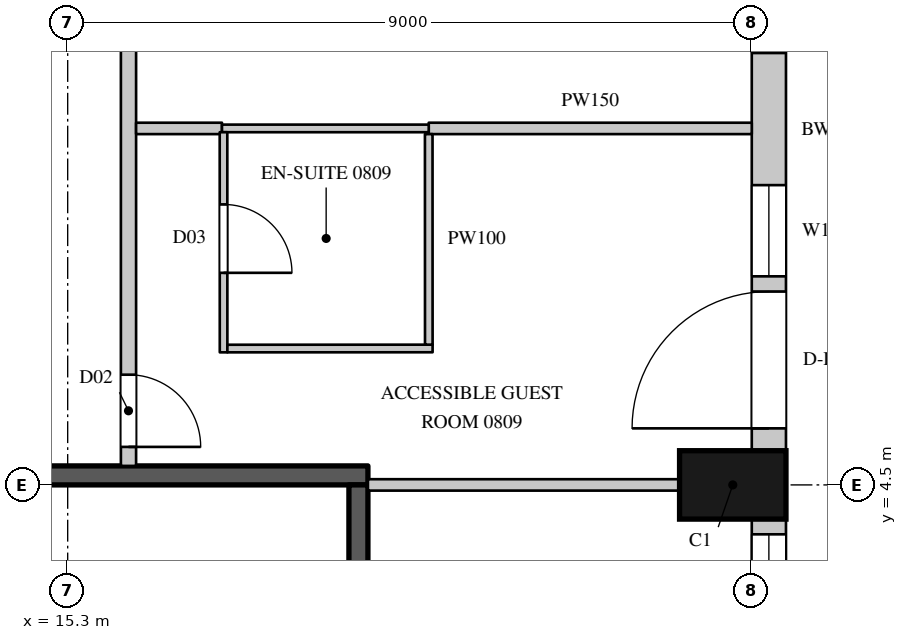
"""IFC4 building model, lengths in metres.
Left out: names, types, materials, properties, quantities, classifications, styles, units other than length and angle.
Written with IfcOpenShell. Run it as: python <this file> out.ifc"""

import sys

from ifc_helpers import new_model, si_unit, direction, frame, frame_2d, origin, origin_2d, place, context, subcontext, project, spatial, rectangle, extrude, element, fill, save


model = new_model("IFC4")
c1 = context("Model", 3, precision=1e-05, world=origin(), true_north=direction((0.0, 1.0)))
c2 = subcontext(c1, "Body", "Model", "MODEL_VIEW")
j1 = project(units=[si_unit("LENGTHUNIT", "METRE"), si_unit("PLANEANGLEUNIT", "RADIAN")], contexts=[c1])
p1 = place(None, origin())
s1 = spatial("IfcSite", under=j1, at=p1, CompositionType="ELEMENT")
p2 = place(p1, origin())
s2 = spatial("IfcBuilding", under=s1, at=p2, CompositionType="ELEMENT")
p3 = place(p2, frame((0.0, 0.0, 59.1)))
s3 = spatial("IfcBuildingStorey", under=s2, at=p3, CompositionType="ELEMENT", Elevation=59.1)
p4 = place(p3, frame((24.05, 4.5, 0.0), z_axis=(0.0, 0.0, 1.0), x_axis=(0.0, 1.0, 0.0)))
e1 = element("IfcColumn", 1, at=p4, inside=s3, PredefinedType="COLUMN", context=c2, shape_type="SweptSolid", body=[
    extrude(rectangle(XDim=0.9, YDim=1.4, at=origin_2d()), origin(), (0.0, 0.0, 1.0), 3.6),
])
p5 = place(p3, frame((24.525, -4.05, 0.0), z_axis=(0.0, 0.0, 1.0), x_axis=(0.0, 1.0, 0.0)))
e2 = element("IfcWall", 2, at=p5, inside=s3, PredefinedType="SOLIDWALL", context=c2, shape_type="SweptSolid", body=[
    extrude(rectangle(XDim=8.1, YDim=0.45, at=frame_2d((4.05, 0.0))), origin(), (0.0, 0.0, 1.0), 3.3),
])
p6 = place(p5, frame((0.2, 0.0, 0.0)))
e3 = element("IfcOpeningElement", 3, at=p6, cuts=e2, PredefinedType="OPENING", context=c2, shape_type="SweptSolid", body=[
    extrude(rectangle(XDim=1.8, YDim=2.4, at=frame_2d((0.9, 1.2))), frame((0.0, 0.235, 0.0), z_axis=(0.0, -1.0, 0.0), x_axis=(1.0, 0.0, 0.0)), (0.0, 0.0, 1.0), 0.47),
])
p7 = place(p5, frame((2.2, 0.0, 1.05)))
e4 = element("IfcOpeningElement", 4, at=p7, cuts=e2, PredefinedType="OPENING", context=c2, shape_type="SweptSolid", body=[
    extrude(rectangle(XDim=1.2, YDim=2.0, at=frame_2d((0.6, 1.0))), frame((0.0, 0.235, 0.0), z_axis=(0.0, -1.0, 0.0), x_axis=(1.0, 0.0, 0.0)), (0.0, 0.0, 1.0), 0.47),
])
p8 = place(p5, frame((4.7, 0.0, 0.0)))
e5 = element("IfcOpeningElement", 5, at=p8, cuts=e2, PredefinedType="OPENING", context=c2, shape_type="SweptSolid", body=[
    extrude(rectangle(XDim=1.8, YDim=2.4, at=frame_2d((0.9, 1.2))), frame((0.0, 0.235, 0.0), z_axis=(0.0, -1.0, 0.0), x_axis=(1.0, 0.0, 0.0)), (0.0, 0.0, 1.0), 0.47),
])
p9 = place(p5, frame((6.7, 0.0, 1.05)))
e6 = element("IfcOpeningElement", 6, at=p9, cuts=e2, PredefinedType="OPENING", context=c2, shape_type="SweptSolid", body=[
    extrude(rectangle(XDim=1.2, YDim=2.0, at=frame_2d((0.6, 1.0))), frame((0.0, 0.235, 0.0), z_axis=(0.0, -1.0, 0.0), x_axis=(1.0, 0.0, 0.0)), (0.0, 0.0, 1.0), 0.47),
])
p10 = place(p3, frame((24.525, 4.95, 0.0), z_axis=(0.0, 0.0, 1.0), x_axis=(0.0, 1.0, 0.0)))
e7 = element("IfcWall", 7, at=p10, inside=s3, PredefinedType="SOLIDWALL", context=c2, shape_type="SweptSolid", body=[
    extrude(rectangle(XDim=8.439, YDim=0.45, at=frame_2d((4.219, 0.0))), origin(), (0.0, 0.0, 1.0), 3.3),
])
p11 = place(p10, frame((0.294, 0.0, 0.0)))
e8 = element("IfcOpeningElement", 8, at=p11, cuts=e7, PredefinedType="OPENING", context=c2, shape_type="SweptSolid", body=[
    extrude(rectangle(XDim=1.8, YDim=2.4, at=frame_2d((0.9, 1.2))), frame((0.0, 0.235, 0.0), z_axis=(0.0, -1.0, 0.0), x_axis=(1.0, 0.0, 0.0)), (0.0, 0.0, 1.0), 0.47),
])
p12 = place(p10, frame((2.294, 0.0, 1.05)))
e9 = element("IfcOpeningElement", 9, at=p12, cuts=e7, PredefinedType="OPENING", context=c2, shape_type="SweptSolid", body=[
    extrude(rectangle(XDim=1.2, YDim=2.0, at=frame_2d((0.6, 1.0))), frame((0.0, 0.235, 0.0), z_axis=(0.0, -1.0, 0.0), x_axis=(1.0, 0.0, 0.0)), (0.0, 0.0, 1.0), 0.47),
])
p13 = place(p10, frame((5.232, 0.0, 1.05)))
e10 = element("IfcOpeningElement", 10, at=p13, cuts=e7, PredefinedType="OPENING", context=c2, shape_type="SweptSolid", body=[
    extrude(rectangle(XDim=2.7, YDim=2.0, at=frame_2d((1.35, 1.0))), frame((0.0, 0.235, 0.0), z_axis=(0.0, -1.0, 0.0), x_axis=(1.0, 0.0, 0.0)), (0.0, 0.0, 1.0), 0.47),
])
p14 = place(p3, frame((16.1, 4.75, 0.0), z_axis=(0.0, 0.0, 1.0), x_axis=(0.0, 1.0, 0.0)))
e11 = element("IfcWall", 11, at=p14, inside=s3, PredefinedType="PARTITIONING", context=c2, shape_type="SweptSolid", body=[
    extrude(rectangle(XDim=12.65, YDim=0.2, at=frame_2d((6.325, 0.0))), origin(), (0.0, 0.0, 1.0), 3.3),
])
p15 = place(p14, frame((0.25, 0.0, 0.0)))
e12 = element("IfcOpeningElement", 12, at=p15, cuts=e11, PredefinedType="OPENING", context=c2, shape_type="SweptSolid", body=[
    extrude(rectangle(XDim=0.95, YDim=2.2, at=frame_2d((0.475, 1.1))), frame((0.0, 0.11, 0.0), z_axis=(0.0, -1.0, 0.0), x_axis=(1.0, 0.0, 0.0)), (0.0, 0.0, 1.0), 0.22),
])
p16 = place(p14, frame((6.9, 0.0, 0.0)))
e13 = element("IfcOpeningElement", 13, at=p16, cuts=e11, PredefinedType="OPENING", context=c2, shape_type="SweptSolid", body=[
    extrude(rectangle(XDim=0.95, YDim=2.2, at=frame_2d((0.475, 1.1))), frame((0.0, 0.11, 0.0), z_axis=(0.0, -1.0, 0.0), x_axis=(1.0, 0.0, 0.0)), (0.0, 0.0, 1.0), 0.22),
])
p17 = place(p3, frame((16.2, 9.19, 0.0), z_axis=(0.0, 0.0, 1.0), x_axis=(1.0, 0.0, 0.0)))
e14 = element("IfcWall", 14, at=p17, inside=s3, PredefinedType="PARTITIONING", context=c2, shape_type="SweptSolid", body=[
    extrude(rectangle(XDim=1.13, YDim=0.15, at=frame_2d((0.565, 0.0))), origin(), (0.0, 0.0, 1.0), 2.65),
])
p18 = place(p3, frame((19.25, 4.5, 0.0), z_axis=(0.0, 0.0, 1.0), x_axis=(1.0, 0.0, 0.0)))
e15 = element("IfcWall", 15, at=p18, inside=s3, PredefinedType="PARTITIONING", context=c2, shape_type="SweptSolid", body=[
    extrude(rectangle(XDim=4.1, YDim=0.15, at=frame_2d((2.05, 0.0))), origin(), (0.0, 0.0, 1.0), 3.3),
])
p19 = place(p3, frame((20.05, 9.19, 0.0), z_axis=(0.0, 0.0, 1.0), x_axis=(1.0, 0.0, 0.0)))
e16 = element("IfcWall", 16, at=p19, inside=s3, PredefinedType="PARTITIONING", context=c2, shape_type="SweptSolid", body=[
    extrude(rectangle(XDim=4.25, YDim=0.15, at=frame_2d((2.125, 0.0))), origin(), (0.0, 0.0, 1.0), 2.65),
])
p20 = place(p3, frame((14.55, 4.625, 0.0), z_axis=(0.0, 0.0, 1.0), x_axis=(1.0, 0.0, 0.0)))
e17 = element("IfcWall", 17, at=p20, inside=s3, PredefinedType="SHEAR", context=c2, shape_type="SweptSolid", body=[
    extrude(rectangle(XDim=4.7, YDim=0.25, at=frame_2d((2.35, 0.0))), origin(), (0.0, 0.0, 1.0), 3.3),
])
p21 = place(p3, frame((19.125, -4.5, 0.0), z_axis=(0.0, 0.0, 1.0), x_axis=(0.0, 1.0, 0.0)))
e18 = element("IfcWall", 18, at=p21, inside=s3, PredefinedType="SHEAR", context=c2, shape_type="SweptSolid", body=[
    extrude(rectangle(XDim=9.0, YDim=0.25, at=frame_2d((4.5, 0.0))), origin(), (0.0, 0.0, 1.0), 3.3),
])
p22 = place(p3, frame((17.33, 9.19, 0.0), z_axis=(0.0, 0.0, 1.0), x_axis=(1.0, 0.0, 0.0)))
e19 = element("IfcWall", 19, at=p22, inside=s3, PredefinedType="PARTITIONING", context=c2, shape_type="SweptSolid", body=[
    extrude(rectangle(XDim=2.72, YDim=0.1, at=frame_2d((1.36, 0.0))), origin(), (0.0, 0.0, 1.0), 2.65),
])
p23 = place(p3, frame((17.35, 9.14, 0.0), z_axis=(0.0, 0.0, 1.0), x_axis=(0.000337211244, -0.999999943144, 0.0)))
e20 = element("IfcWall", 20, at=p23, inside=s3, PredefinedType="PARTITIONING", context=c2, shape_type="SweptSolid", body=[
    extrude(rectangle(XDim=2.896, YDim=0.1, at=frame_2d((1.448, 0.0))), origin(), (0.0, 0.0, 1.0), 3.3),
])
p24 = place(p23, frame((0.95, 0.0, 0.0)))
e21 = element("IfcOpeningElement", 21, at=p24, cuts=e20, PredefinedType="OPENING", context=c2, shape_type="SweptSolid", body=[
    extrude(rectangle(XDim=0.9, YDim=2.2, at=frame_2d((0.45, 1.1))), frame((0.0, 0.06, 0.0), z_axis=(0.0, -1.0, 0.0), x_axis=(1.0, 0.0, 0.0)), (0.0, 0.0, 1.0), 0.12),
])
p25 = place(p3, frame((17.401, 6.294, 0.0), z_axis=(0.0, 0.0, 1.0), x_axis=(0.9999999346, 0.000361663629, 0.0)))
e22 = element("IfcWall", 22, at=p25, inside=s3, PredefinedType="PARTITIONING", context=c2, shape_type="SweptSolid", body=[
    extrude(rectangle(XDim=2.7, YDim=0.1, at=frame_2d((1.35, 0.0))), origin(), (0.0, 0.0, 1.0), 3.3),
])
p26 = place(p3, frame((20.05, 9.115, 0.0), z_axis=(0.0, 0.0, 1.0), x_axis=(0.000352547131, -0.999999937855, 0.0)))
e23 = element("IfcWall", 23, at=p26, inside=s3, PredefinedType="PARTITIONING", context=c2, shape_type="SweptSolid", body=[
    extrude(rectangle(XDim=2.77, YDim=0.1, at=frame_2d((1.385, 0.0))), origin(), (0.0, 0.0, 1.0), 3.3),
])
p27 = place(p9, origin())
e24 = element("IfcWindow", 24, at=p27, inside=s3, PartitioningType="SINGLE_PANEL", PredefinedType="WINDOW", context=c2, shape_type="SweptSolid", body=[
    extrude(rectangle(XDim=1.2, YDim=2.0, at=frame_2d((0.6, 1.0))), frame((0.0, 0.135, 0.0), z_axis=(0.0, -1.0, 0.0), x_axis=(1.0, 0.0, 0.0)), (0.0, 0.0, 1.0), 0.06),
])
fill(e6, e24)
p28 = place(p11, origin())
e25 = element("IfcDoor", 25, at=p28, inside=s3, OperationType="SLIDING_TO_LEFT", PredefinedType="DOOR", context=c2, shape_type="SweptSolid", body=[
    extrude(rectangle(XDim=1.8, YDim=2.4, at=frame_2d((0.9, 1.2))), frame((0.0, 0.13, 0.0), z_axis=(0.0, -1.0, 0.0), x_axis=(1.0, 0.0, 0.0)), (0.0, 0.0, 1.0), 0.05),
])
fill(e8, e25)
p29 = place(p12, origin())
e26 = element("IfcWindow", 26, at=p29, inside=s3, PartitioningType="SINGLE_PANEL", PredefinedType="WINDOW", context=c2, shape_type="SweptSolid", body=[
    extrude(rectangle(XDim=1.2, YDim=2.0, at=frame_2d((0.6, 1.0))), frame((0.0, 0.135, 0.0), z_axis=(0.0, -1.0, 0.0), x_axis=(1.0, 0.0, 0.0)), (0.0, 0.0, 1.0), 0.06),
])
fill(e9, e26)
p30 = place(p13, origin())
e27 = element("IfcWindow", 27, at=p30, inside=s3, PartitioningType="SINGLE_PANEL", PredefinedType="WINDOW", context=c2, shape_type="SweptSolid", body=[
    extrude(rectangle(XDim=2.7, YDim=2.0, at=frame_2d((1.35, 1.0))), frame((0.0, 0.135, 0.0), z_axis=(0.0, -1.0, 0.0), x_axis=(1.0, 0.0, 0.0)), (0.0, 0.0, 1.0), 0.06),
])
fill(e10, e27)
p31 = place(p15, origin())
e28 = element("IfcDoor", 28, at=p31, inside=s3, OperationType="SINGLE_SWING_RIGHT", PredefinedType="DOOR", context=c2, shape_type="SweptSolid", body=[
    extrude(rectangle(XDim=0.95, YDim=2.2, at=frame_2d((0.475, 1.1))), frame((0.0, 0.025, 0.0), z_axis=(0.0, -1.0, 0.0), x_axis=(1.0, 0.0, 0.0)), (0.0, 0.0, 1.0), 0.05),
])
fill(e12, e28)
p32 = place(p24, origin())
e29 = element("IfcDoor", 29, at=p32, inside=s3, OperationType="SINGLE_SWING_RIGHT", PredefinedType="DOOR", context=c2, shape_type="SweptSolid", body=[
    extrude(rectangle(XDim=0.9, YDim=2.2, at=frame_2d((0.45, 1.1))), frame((0.0, 0.025, 0.0), z_axis=(0.0, -1.0, 0.0), x_axis=(1.0, 0.0, 0.0)), (0.0, 0.0, 1.0), 0.05),
])
fill(e21, e29)
save(model, sys.argv[1])
